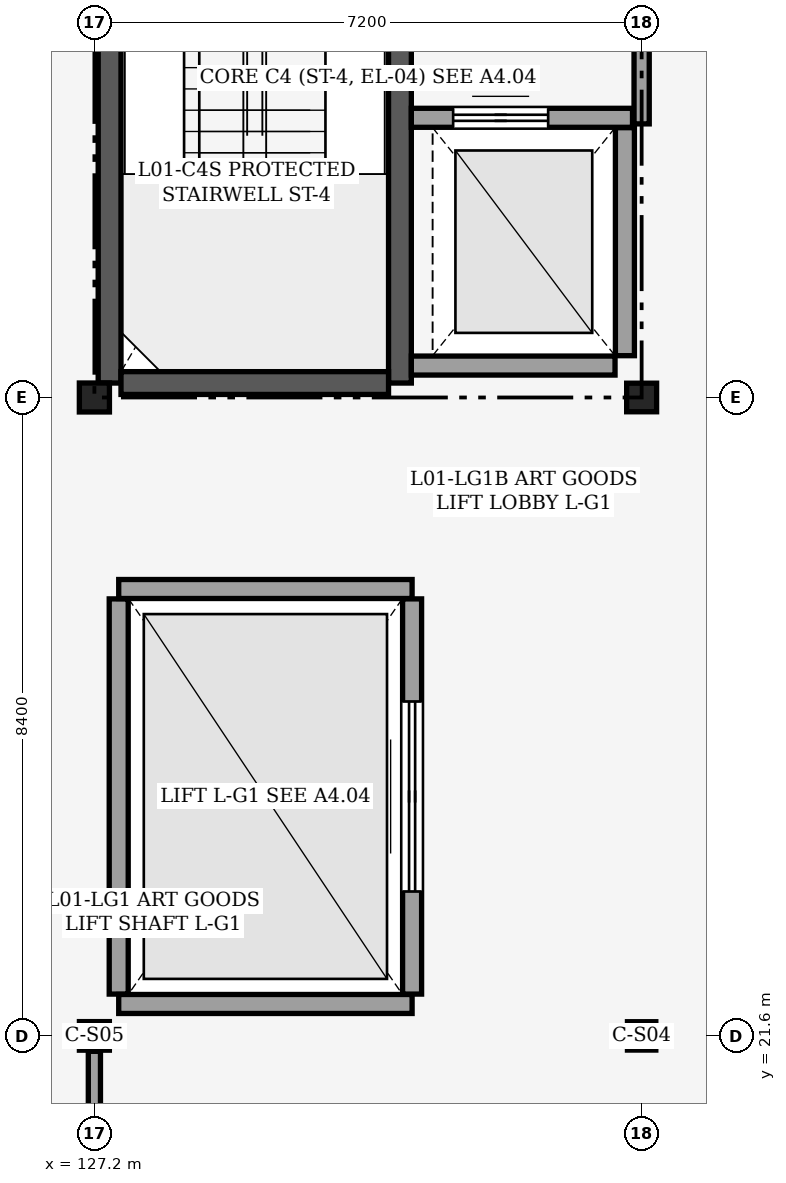
"""IFC4 building model, lengths in metres.
Left out: names, types, materials, properties, quantities, classifications, styles, units other than length and angle.
Written with IfcOpenShell. Run it as: python <this file> out.ifc"""

import sys

from ifc_helpers import new_model, si_unit, direction, frame, frame_2d, origin, origin_2d, place, context, subcontext, project, spatial, rectangle, i_section, extrude, element, fill, save


model = new_model("IFC4")
c1 = context("Model", 3, precision=1e-05, world=origin(), true_north=direction((0.0, 1.0)))
c2 = subcontext(c1, "Body", "Model", "MODEL_VIEW")
j1 = project(units=[si_unit("LENGTHUNIT", "METRE"), si_unit("PLANEANGLEUNIT", "RADIAN")], contexts=[c1])
p1 = place(None, origin())
s1 = spatial("IfcSite", under=j1, at=p1, CompositionType="ELEMENT")
p2 = place(p1, origin())
s2 = spatial("IfcBuilding", under=s1, at=p2, CompositionType="ELEMENT")
p3 = place(p2, frame((0.0, 0.0, 5.4)))
s3 = spatial("IfcBuildingStorey", under=s2, at=p3, CompositionType="ELEMENT", Elevation=5.4)
p4 = place(p3, frame((127.2, 21.6, 0.0), z_axis=(0.0, 0.0, 1.0), x_axis=(1.0, 0.0, 0.0)))
e1 = element("IfcColumn", 1, at=p4, inside=s3, PredefinedType="COLUMN", context=c2, shape_type="SweptSolid", body=[
    extrude(i_section(OverallWidth=0.394, OverallDepth=0.376, WebThickness=0.017, FlangeThickness=0.028, FilletRadius=0.025, at=origin_2d()), origin(), (0.0, 0.0, 1.0), 4.8),
])
p5 = place(p3, frame((127.2, 30.0, 0.0), z_axis=(0.0, 0.0, 1.0), x_axis=(1.0, 0.0, 0.0)))
e2 = element("IfcColumn", 2, at=p5, inside=s3, PredefinedType="COLUMN", context=c2, shape_type="SweptSolid", body=[
    extrude(i_section(OverallWidth=0.396, OverallDepth=0.381, WebThickness=0.019, FlangeThickness=0.03, FilletRadius=0.025, at=origin_2d()), origin(), (0.0, 0.0, 1.0), 4.8),
])
p6 = place(p3, frame((134.4, 21.6, 0.0), z_axis=(0.0, 0.0, 1.0), x_axis=(1.0, 0.0, 0.0)))
e3 = element("IfcColumn", 3, at=p6, inside=s3, PredefinedType="COLUMN", context=c2, shape_type="SweptSolid", body=[
    extrude(i_section(OverallWidth=0.373, OverallDepth=0.373, WebThickness=0.016, FlangeThickness=0.026, FilletRadius=0.025, at=origin_2d()), origin(), (0.0, 0.0, 1.0), 4.8),
])
p7 = place(p3, frame((134.4, 30.0, 0.0), z_axis=(0.0, 0.0, 1.0), x_axis=(1.0, 0.0, 0.0)))
e4 = element("IfcColumn", 4, at=p7, inside=s3, PredefinedType="COLUMN", context=c2, shape_type="SweptSolid", body=[
    extrude(i_section(OverallWidth=0.394, OverallDepth=0.376, WebThickness=0.017, FlangeThickness=0.028, FilletRadius=0.025, at=origin_2d()), origin(), (0.0, 0.0, 1.0), 4.8),
])
p8 = place(p3, frame((127.4, 30.19, 0.0), z_axis=(0.0, 0.0, 1.0), x_axis=(0.0, 1.0, 0.0)))
e5 = element("IfcWall", 5, at=p8, inside=s3, PredefinedType="SHEAR", context=c2, shape_type="SweptSolid", body=[
    extrude(rectangle(XDim=8.02, YDim=0.3, at=frame_2d((4.01, 0.0))), origin(), (0.0, 0.0, 1.0), 4.54),
])
p9 = place(p3, frame((131.22, 30.19, 0.0), z_axis=(0.0, 0.0, 1.0), x_axis=(0.0, 1.0, 0.0)))
e6 = element("IfcWall", 6, at=p9, inside=s3, PredefinedType="SHEAR", context=c2, shape_type="SweptSolid", body=[
    extrude(rectangle(XDim=8.02, YDim=0.3, at=frame_2d((4.01, 0.0))), origin(), (0.0, 0.0, 1.0), 4.54),
])
p10 = place(p9, frame((6.47, 0.0, 0.0)))
e7 = element("IfcOpeningElement", 7, at=p10, cuts=e6, PredefinedType="OPENING", context=c2, shape_type="SweptSolid", body=[
    extrude(rectangle(XDim=1.1, YDim=2.15, at=frame_2d((0.55, 1.075))), frame((0.0, 0.16, 0.0), z_axis=(0.0, -1.0, 0.0), x_axis=(1.0, 0.0, 0.0)), (0.0, 0.0, 1.0), 0.321),
])
p11 = place(p3, frame((127.55, 30.19, 0.0), z_axis=(0.0, 0.0, 1.0), x_axis=(1.0, 0.0, 0.0)))
e8 = element("IfcWall", 8, at=p11, inside=s3, PredefinedType="SHEAR", context=c2, shape_type="SweptSolid", body=[
    extrude(rectangle(XDim=3.52, YDim=0.3, at=frame_2d((1.76, 0.0))), origin(), (0.0, 0.0, 1.0), 4.54),
])
p12 = place(p3, frame((131.37, 30.42, 0.0), z_axis=(0.0, 0.0, 1.0), x_axis=(1.0, 0.0, 0.0)))
e9 = element("IfcWall", 9, at=p12, inside=s3, PredefinedType="PARTITIONING", context=c2, shape_type="SweptSolid", body=[
    extrude(rectangle(XDim=2.68, YDim=0.25, at=frame_2d((1.34, 0.0))), origin(), (0.0, 0.0, 1.0), 4.54),
])
p13 = place(p3, frame((134.18, 30.55, 0.0), z_axis=(0.0, 0.0, 1.0), x_axis=(0.0, 1.0, 0.0)))
e10 = element("IfcWall", 10, at=p13, inside=s3, PredefinedType="PARTITIONING", context=c2, shape_type="SweptSolid", body=[
    extrude(rectangle(XDim=3.0, YDim=0.25, at=frame_2d((1.5, 0.0))), origin(), (0.0, 0.0, 1.0), 3.748),
])
p14 = place(p3, frame((131.37, 33.68, 0.0), z_axis=(0.0, 0.0, 1.0), x_axis=(1.0, 0.0, 0.0)))
e11 = element("IfcWall", 11, at=p14, inside=s3, PredefinedType="PARTITIONING", context=c2, shape_type="SweptSolid", body=[
    extrude(rectangle(XDim=2.91, YDim=0.25, at=frame_2d((1.455, 0.0))), origin(), (0.0, 0.0, 1.0), 4.54),
])
p15 = place(p14, frame((0.55, 0.0, 0.0)))
e12 = element("IfcOpeningElement", 12, at=p15, cuts=e11, PredefinedType="OPENING", context=c2, shape_type="SweptSolid", body=[
    extrude(rectangle(XDim=1.25, YDim=2.15, at=frame_2d((0.625, 1.075))), frame((0.0, 0.135, 0.0), z_axis=(0.0, -1.0, 0.0), x_axis=(1.0, 0.0, 0.0)), (0.0, 0.0, 1.0), 0.271),
])
p16 = place(p3, frame((134.4, 33.6, 0.0), z_axis=(0.0, 0.0, 1.0), x_axis=(0.0, 1.0, 0.0)))
e13 = element("IfcWall", 13, at=p16, inside=s3, PredefinedType="PARTITIONING", context=c2, shape_type="SweptSolid", body=[
    extrude(rectangle(XDim=4.58, YDim=0.2, at=frame_2d((2.29, 0.0))), origin(), (0.0, 0.0, 1.0), 3.748),
])
p17 = place(p3, frame((127.52, 22.15, 0.0), z_axis=(0.0, 0.0, 1.0), x_axis=(0.0, 1.0, 0.0)))
e14 = element("IfcWall", 14, at=p17, inside=s3, PredefinedType="PARTITIONING", context=c2, shape_type="SweptSolid", body=[
    extrude(rectangle(XDim=5.2, YDim=0.25, at=frame_2d((2.6, 0.0))), origin(), (0.0, 0.0, 1.0), 3.593),
])
for number, where, z_axis, x_axis in (
    (15, (127.52, 27.48, 0.0), (0.0, 0.0, 1.0), (1.0, 0.0, 0.0)),
    (16, (127.52, 22.02, 0.0), (0.0, 0.0, 1.0), (1.0, 0.0, 0.0)),
):
    element("IfcWall", number, at=place(p3, frame(where, z_axis=z_axis, x_axis=x_axis)), inside=s3, PredefinedType="PARTITIONING", context=c2, shape_type="SweptSolid", body=[
        extrude(rectangle(XDim=3.86, YDim=0.25, at=frame_2d((1.93, 0.0))), origin(), (0.0, 0.0, 1.0), 4.54),
    ])
p18 = place(p3, frame((131.38, 22.15, 0.0), z_axis=(0.0, 0.0, 1.0), x_axis=(0.0, 1.0, 0.0)))
e17 = element("IfcWall", 17, at=p18, inside=s3, PredefinedType="PARTITIONING", context=c2, shape_type="SweptSolid", body=[
    extrude(rectangle(XDim=5.2, YDim=0.25, at=frame_2d((2.6, 0.0))), origin(), (0.0, 0.0, 1.0), 4.54),
])
p19 = place(p18, frame((1.35, 0.0, 0.0)))
e18 = element("IfcOpeningElement", 18, at=p19, cuts=e17, PredefinedType="OPENING", context=c2, shape_type="SweptSolid", body=[
    extrude(rectangle(XDim=2.5, YDim=2.6, at=frame_2d((1.25, 1.3))), frame((0.0, 0.135, 0.0), z_axis=(0.0, -1.0, 0.0), x_axis=(1.0, 0.0, 0.0)), (0.0, 0.0, 1.0), 0.271),
])
p20 = place(p3, frame((127.2, 14.593, 0.0), z_axis=(0.0, 0.0, 1.0), x_axis=(0.0, 1.0, 0.0)))
e19 = element("IfcWall", 19, at=p20, inside=s3, PredefinedType="PARTITIONING", context=c2, shape_type="SweptSolid", body=[
    extrude(rectangle(XDim=6.804, YDim=0.16, at=frame_2d((3.402, 0.0))), origin(), (0.0, 0.0, 1.0), 3.913),
])
p21 = place(p15, origin())
e20 = element("IfcDoor", 20, at=p21, inside=s3, OperationType="DOUBLE_DOOR_SLIDING", PredefinedType="DOOR", context=c2, shape_type="SweptSolid", body=[
    extrude(rectangle(XDim=1.25, YDim=2.15, at=frame_2d((0.625, 1.075))), frame((0.0, 0.025, 0.0), z_axis=(0.0, -1.0, 0.0), x_axis=(1.0, 0.0, 0.0)), (0.0, 0.0, 1.0), 0.05),
])
fill(e12, e20)
p22 = place(p19, origin())
e21 = element("IfcDoor", 21, at=p22, inside=s3, OperationType="DOUBLE_DOOR_SLIDING", PredefinedType="DOOR", context=c2, shape_type="SweptSolid", body=[
    extrude(rectangle(XDim=2.5, YDim=2.6, at=frame_2d((1.25, 1.3))), frame((0.0, 0.025, 0.0), z_axis=(0.0, -1.0, 0.0), x_axis=(1.0, 0.0, 0.0)), (0.0, 0.0, 1.0), 0.05),
])
fill(e18, e21)
save(model, sys.argv[1])
